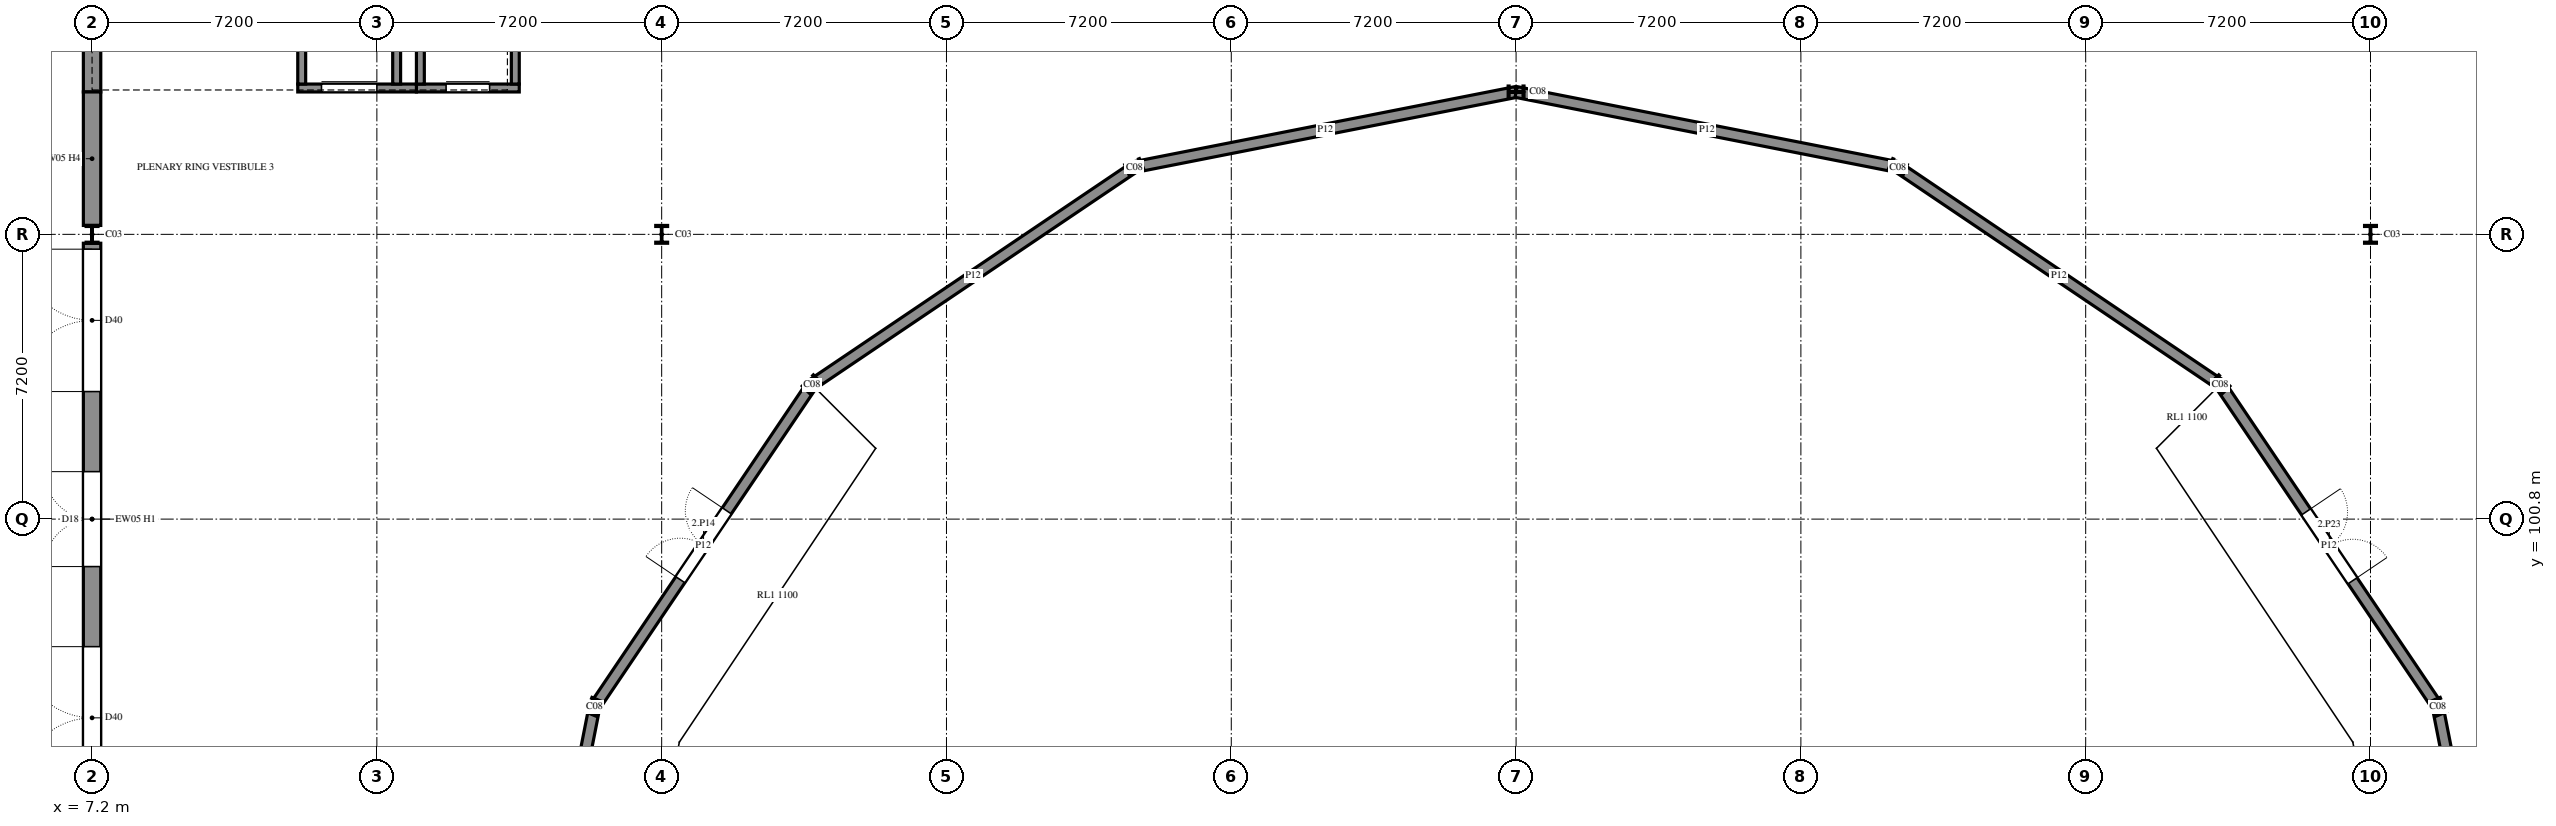
"""IFC4 building model, lengths in metres.
Left out: names, types, materials, properties, quantities, classifications, styles, units other than length and angle.
Written with IfcOpenShell. Run it as: python <this file> out.ifc"""

import sys

from ifc_helpers import new_model, si_unit, direction, frame, frame_2d, origin, origin_2d, place, context, subcontext, project, spatial, rectangle, i_section, extrude, element, fill, save


model = new_model("IFC4")
c1 = context("Model", 3, precision=1e-05, world=origin(), true_north=direction((0.0, 1.0)))
c2 = subcontext(c1, "Body", "Model", "MODEL_VIEW")
j1 = project(units=[si_unit("LENGTHUNIT", "METRE"), si_unit("PLANEANGLEUNIT", "RADIAN")], contexts=[c1])
p1 = place(None, origin())
s1 = spatial("IfcSite", under=j1, at=p1, CompositionType="ELEMENT")
p2 = place(p1, origin())
s2 = spatial("IfcBuilding", under=s1, at=p2, CompositionType="ELEMENT")
p3 = place(p2, frame((0.0, 0.0, 7.2)))
s3 = spatial("IfcBuildingStorey", under=s2, at=p3, CompositionType="ELEMENT", Elevation=7.2)
for number, where, z_axis, x_axis in (
    (1, (7.2, 108.0, 0.0), (0.0, 0.0, 1.0), (1.0, 0.0, 0.0)),
    (2, (21.6, 108.0, 0.0), (0.0, 0.0, 1.0), (1.0, 0.0, 0.0)),
    (3, (64.8, 108.0, 0.0), (0.0, 0.0, 1.0), (1.0, 0.0, 0.0)),
):
    element("IfcColumn", number, at=place(p3, frame(where, z_axis=z_axis, x_axis=x_axis)), inside=s3, PredefinedType="COLUMN", context=c2, shape_type="SweptSolid", body=[
        extrude(i_section(OverallWidth=0.3, OverallDepth=0.45, WebThickness=0.014, FlangeThickness=0.026, FilletRadius=0.027, at=origin_2d()), origin(), (0.0, 0.0, 1.0), 3.6),
    ])
for number, where, z_axis, x_axis in (
    (4, (66.5, 96.05, 0.0), (0.0, 0.0, 1.0), (0.924, 0.383, 0.0)),
    (5, (61.0, 104.2, 0.0), (0.0, 0.0, 1.0), (0.707, 0.707, 0.0)),
    (6, (52.85, 109.7, 0.0), (0.0, 0.0, 1.0), (0.383, 0.924, 0.0)),
    (7, (43.2, 111.6, 0.0), (0.0, 0.0, 1.0), (0.0, 1.0, 0.0)),
    (8, (33.55, 109.7, 0.0), (0.0, 0.0, 1.0), (-0.383, 0.924, 0.0)),
    (9, (25.4, 104.2, 0.0), (0.0, 0.0, 1.0), (-0.707, 0.707, 0.0)),
    (10, (19.9, 96.05, 0.0), (0.0, 0.0, 1.0), (-0.924, 0.383, 0.0)),
):
    element("IfcColumn", number, at=place(p3, frame(where, z_axis=z_axis, x_axis=x_axis)), inside=s3, PredefinedType="COLUMN", context=c2, shape_type="SweptSolid", body=[
        extrude(i_section(OverallWidth=0.3, OverallDepth=0.4, WebThickness=0.013, FlangeThickness=0.024, FilletRadius=0.027, at=origin_2d()), origin(), (0.0, 0.0, 1.0), 3.6),
    ])
p4 = place(p3, frame((7.2, 115.775, 0.0), z_axis=(0.0, 0.0, 1.0), x_axis=(0.0, -1.0, 0.0)))
e11 = element("IfcWall", 11, at=p4, inside=s3, PredefinedType="SOLIDWALL", context=c2, shape_type="SweptSolid", body=[
    extrude(rectangle(XDim=4.175, YDim=0.44, at=frame_2d((2.087, 0.0))), origin(), (0.0, 0.0, 1.0), 3.42),
])
p5 = place(p4, frame((1.175, 0.0, 0.015)))
e12 = element("IfcOpeningElement", 12, at=p5, cuts=e11, PredefinedType="OPENING", context=c2, shape_type="SweptSolid", body=[
    extrude(rectangle(XDim=1.8, YDim=2.1, at=frame_2d((0.9, 1.05))), frame((0.0, 0.23, 0.0), z_axis=(0.0, -1.0, 0.0), x_axis=(1.0, 0.0, 0.0)), (0.0, 0.0, 1.0), 0.46),
])
p6 = place(p3, frame((7.2, 111.6, 0.0), z_axis=(0.0, 0.0, 1.0), x_axis=(0.0, -1.0, 0.0)))
e13 = element("IfcWall", 13, at=p6, inside=s3, PredefinedType="SOLIDWALL", context=c2, shape_type="SweptSolid", body=[
    extrude(rectangle(XDim=3.375, YDim=0.44, at=frame_2d((1.688, 0.0))), origin(), (0.0, 0.0, 1.0), 3.42),
])
p7 = place(p3, frame((7.2, 107.775, 0.0), z_axis=(0.0, 0.0, 1.0), x_axis=(0.0, -1.0, 0.0)))
e14 = element("IfcWall", 14, at=p7, inside=s3, PredefinedType="SOLIDWALL", context=c2, shape_type="SweptSolid", body=[
    extrude(rectangle(XDim=13.95, YDim=0.44, at=frame_2d((6.975, 0.0))), origin(), (0.0, 0.0, 1.0), 2.82),
])
p8 = place(p7, frame((0.15, 0.0, 0.0)))
e15 = element("IfcOpeningElement", 15, at=p8, cuts=e14, PredefinedType="OPENING", context=c2, shape_type="SweptSolid", body=[
    extrude(rectangle(XDim=3.6, YDim=2.7, at=frame_2d((1.8, 1.35))), frame((0.0, 0.23, 0.0), z_axis=(0.0, -1.0, 0.0), x_axis=(1.0, 0.0, 0.0)), (0.0, 0.0, 1.0), 0.46),
])
p9 = place(p7, frame((5.775, 0.0, 0.0)))
e16 = element("IfcOpeningElement", 16, at=p9, cuts=e14, PredefinedType="OPENING", context=c2, shape_type="SweptSolid", body=[
    extrude(rectangle(XDim=2.4, YDim=2.4, at=frame_2d((1.2, 1.2))), frame((0.0, 0.23, 0.0), z_axis=(0.0, -1.0, 0.0), x_axis=(1.0, 0.0, 0.0)), (0.0, 0.0, 1.0), 0.46),
])
p10 = place(p7, frame((10.2, 0.0, 0.0)))
e17 = element("IfcOpeningElement", 17, at=p10, cuts=e14, PredefinedType="OPENING", context=c2, shape_type="SweptSolid", body=[
    extrude(rectangle(XDim=3.6, YDim=2.7, at=frame_2d((1.8, 1.35))), frame((0.0, 0.23, 0.0), z_axis=(0.0, -1.0, 0.0), x_axis=(1.0, 0.0, 0.0)), (0.0, 0.0, 1.0), 0.46),
])
p11 = place(p3, frame((15.4, 111.7, 0.0), z_axis=(0.0, 0.0, 1.0), x_axis=(1.0, 0.0, 0.0)))
e18 = element("IfcWall", 18, at=p11, inside=s3, PredefinedType="SHEAR", context=c2, shape_type="SweptSolid", body=[
    extrude(rectangle(XDim=2.6, YDim=0.2, at=frame_2d((1.3, 0.0))), origin(), (0.0, 0.0, 1.0), 3.6),
])
p12 = place(p11, frame((0.75, 0.0, 0.0)))
e19 = element("IfcOpeningElement", 19, at=p12, cuts=e18, PredefinedType="OPENING", context=c2, shape_type="SweptSolid", body=[
    extrude(rectangle(XDim=1.1, YDim=2.1, at=frame_2d((0.55, 1.05))), frame((0.0, 0.11, 0.0), z_axis=(0.0, -1.0, 0.0), x_axis=(1.0, 0.0, 0.0)), (0.0, 0.0, 1.0), 0.22),
])
for number, where, z_axis, x_axis in (
    (20, (15.5, 111.8, 0.0), (0.0, 0.0, 1.0), (0.0, 1.0, 0.0)),
    (21, (17.9, 111.8, 0.0), (0.0, 0.0, 1.0), (0.0, 1.0, 0.0)),
):
    element("IfcWall", number, at=place(p3, frame(where, z_axis=z_axis, x_axis=x_axis)), inside=s3, PredefinedType="SHEAR", context=c2, shape_type="SweptSolid", body=[
        extrude(rectangle(XDim=2.2, YDim=0.2, at=frame_2d((1.1, 0.0))), origin(), (0.0, 0.0, 1.0), 3.6),
    ])
p13 = place(p3, frame((12.4, 111.7, 0.0), z_axis=(0.0, 0.0, 1.0), x_axis=(1.0, 0.0, 0.0)))
e22 = element("IfcWall", 22, at=p13, inside=s3, PredefinedType="SHEAR", context=c2, shape_type="SweptSolid", body=[
    extrude(rectangle(XDim=3.0, YDim=0.2, at=frame_2d((1.5, 0.0))), origin(), (0.0, 0.0, 1.0), 3.6),
])
p14 = place(p13, frame((0.6, 0.0, 0.0)))
e23 = element("IfcOpeningElement", 23, at=p14, cuts=e22, PredefinedType="OPENING", context=c2, shape_type="SweptSolid", body=[
    extrude(rectangle(XDim=1.4, YDim=2.1, at=frame_2d((0.7, 1.05))), frame((0.0, 0.11, 0.0), z_axis=(0.0, -1.0, 0.0), x_axis=(1.0, 0.0, 0.0)), (0.0, 0.0, 1.0), 0.22),
])
for number, where, z_axis, x_axis in (
    (24, (12.5, 111.8, 0.0), (0.0, 0.0, 1.0), (0.0, 1.0, 0.0)),
    (25, (14.9, 111.8, 0.0), (0.0, 0.0, 1.0), (0.0, 1.0, 0.0)),
):
    element("IfcWall", number, at=place(p3, frame(where, z_axis=z_axis, x_axis=x_axis)), inside=s3, PredefinedType="SHEAR", context=c2, shape_type="SweptSolid", body=[
        extrude(rectangle(XDim=2.5, YDim=0.2, at=frame_2d((1.25, 0.0))), origin(), (0.0, 0.0, 1.0), 3.6),
    ])
p15 = place(p3, frame((43.2, 111.6, 0.0), z_axis=(0.0, 0.0, 1.0), x_axis=(-0.981159681755, -0.19319854787, 0.0)))
e26 = element("IfcWall", 26, at=p15, inside=s3, PredefinedType="PARTITIONING", context=c2, shape_type="SweptSolid", body=[
    extrude(rectangle(XDim=9.835, YDim=0.275, at=frame_2d((4.917, 0.0))), origin(), (0.0, 0.0, 1.0), 3.07),
])
p16 = place(p3, frame((33.55, 109.7, 0.0), z_axis=(0.0, 0.0, 1.0), x_axis=(-0.828912285216, -0.559378604719, 0.0)))
e27 = element("IfcWall", 27, at=p16, inside=s3, PredefinedType="PARTITIONING", context=c2, shape_type="SweptSolid", body=[
    extrude(rectangle(XDim=9.832, YDim=0.275, at=frame_2d((4.916, 0.0))), origin(), (0.0, 0.0, 1.0), 3.07),
])
p17 = place(p3, frame((25.4, 104.2, 0.0), z_axis=(0.0, 0.0, 1.0), x_axis=(-0.559390118145, -0.828904515443, 0.0)))
e28 = element("IfcWall", 28, at=p17, inside=s3, PredefinedType="PARTITIONING", context=c2, shape_type="SweptSolid", body=[
    extrude(rectangle(XDim=9.832, YDim=0.275, at=frame_2d((4.916, 0.0))), origin(), (0.0, 0.0, 1.0), 3.07),
])
p18 = place(p17, frame((3.85, 0.0, 0.0)))
e29 = element("IfcOpeningElement", 29, at=p18, cuts=e28, PredefinedType="OPENING", context=c2, shape_type="SweptSolid", body=[
    extrude(rectangle(XDim=2.1, YDim=2.4, at=frame_2d((1.05, 1.2))), frame((0.0, 0.147, 0.0), z_axis=(0.0, -1.0, 0.0), x_axis=(1.0, 0.0, 0.0)), (0.0, 0.0, 1.0), 0.295),
])
p19 = place(p3, frame((19.9, 96.05, 0.0), z_axis=(0.0, 0.0, 1.0), x_axis=(-0.1931699463, -0.98116531321, 0.0)))
e30 = element("IfcWall", 30, at=p19, inside=s3, PredefinedType="PARTITIONING", context=c2, shape_type="SweptSolid", body=[
    extrude(rectangle(XDim=9.835, YDim=0.275, at=frame_2d((4.918, 0.0))), origin(), (0.0, 0.0, 1.0), 3.07),
])
p20 = place(p19, frame((3.85, 0.0, 0.0)))
e31 = element("IfcOpeningElement", 31, at=p20, cuts=e30, PredefinedType="OPENING", context=c2, shape_type="SweptSolid", body=[
    extrude(rectangle(XDim=2.1, YDim=2.4, at=frame_2d((1.05, 1.2))), frame((0.0, 0.147, 0.0), z_axis=(0.0, -1.0, 0.0), x_axis=(1.0, 0.0, 0.0)), (0.0, 0.0, 1.0), 0.295),
])
p21 = place(p3, frame((68.4, 86.4, 0.0), z_axis=(0.0, 0.0, 1.0), x_axis=(-0.1931699463, 0.98116531321, 0.0)))
e32 = element("IfcWall", 32, at=p21, inside=s3, PredefinedType="PARTITIONING", context=c2, shape_type="SweptSolid", body=[
    extrude(rectangle(XDim=9.835, YDim=0.275, at=frame_2d((4.918, 0.0))), origin(), (0.0, 0.0, 1.0), 3.07),
])
p22 = place(p21, frame((3.85, 0.0, 0.0)))
e33 = element("IfcOpeningElement", 33, at=p22, cuts=e32, PredefinedType="OPENING", context=c2, shape_type="SweptSolid", body=[
    extrude(rectangle(XDim=2.1, YDim=2.4, at=frame_2d((1.05, 1.2))), frame((0.0, 0.147, 0.0), z_axis=(0.0, -1.0, 0.0), x_axis=(1.0, 0.0, 0.0)), (0.0, 0.0, 1.0), 0.295),
])
p23 = place(p3, frame((66.5, 96.05, 0.0), z_axis=(0.0, 0.0, 1.0), x_axis=(-0.559390118145, 0.828904515443, 0.0)))
e34 = element("IfcWall", 34, at=p23, inside=s3, PredefinedType="PARTITIONING", context=c2, shape_type="SweptSolid", body=[
    extrude(rectangle(XDim=9.832, YDim=0.275, at=frame_2d((4.916, 0.0))), origin(), (0.0, 0.0, 1.0), 3.07),
])
p24 = place(p23, frame((3.85, 0.0, 0.0)))
e35 = element("IfcOpeningElement", 35, at=p24, cuts=e34, PredefinedType="OPENING", context=c2, shape_type="SweptSolid", body=[
    extrude(rectangle(XDim=2.1, YDim=2.4, at=frame_2d((1.05, 1.2))), frame((0.0, 0.147, 0.0), z_axis=(0.0, -1.0, 0.0), x_axis=(1.0, 0.0, 0.0)), (0.0, 0.0, 1.0), 0.295),
])
p25 = place(p3, frame((61.0, 104.2, 0.0), z_axis=(0.0, 0.0, 1.0), x_axis=(-0.828904515443, 0.559390118145, 0.0)))
e36 = element("IfcWall", 36, at=p25, inside=s3, PredefinedType="PARTITIONING", context=c2, shape_type="SweptSolid", body=[
    extrude(rectangle(XDim=9.832, YDim=0.275, at=frame_2d((4.916, 0.0))), origin(), (0.0, 0.0, 1.0), 3.07),
])
p26 = place(p3, frame((52.85, 109.7, 0.0), z_axis=(0.0, 0.0, 1.0), x_axis=(-0.981160608262, 0.193193842541, 0.0)))
e37 = element("IfcWall", 37, at=p26, inside=s3, PredefinedType="PARTITIONING", context=c2, shape_type="SweptSolid", body=[
    extrude(rectangle(XDim=9.835, YDim=0.275, at=frame_2d((4.918, 0.0))), origin(), (0.0, 0.0, 1.0), 3.07),
])
p27 = place(p8, frame((3.6, 0.0, 0.0), z_axis=(0.0, 0.0, 1.0), x_axis=(-1.0, 0.0, 0.0)))
e38 = element("IfcDoor", 38, at=p27, inside=s3, OperationType="DOUBLE_DOOR_SINGLE_SWING", PredefinedType="DOOR", context=c2, shape_type="SweptSolid", body=[
    extrude(rectangle(XDim=3.6, YDim=2.7, at=frame_2d((1.8, 1.35))), frame((0.0, 0.025, 0.0), z_axis=(0.0, -1.0, 0.0), x_axis=(1.0, 0.0, 0.0)), (0.0, 0.0, 1.0), 0.05),
])
fill(e15, e38)
p28 = place(p9, frame((2.4, 0.0, 0.0), z_axis=(0.0, 0.0, 1.0), x_axis=(-1.0, 0.0, 0.0)))
e39 = element("IfcDoor", 39, at=p28, inside=s3, OperationType="DOUBLE_DOOR_SINGLE_SWING", PredefinedType="DOOR", context=c2, shape_type="SweptSolid", body=[
    extrude(rectangle(XDim=2.4, YDim=2.4, at=frame_2d((1.2, 1.2))), frame((0.0, 0.025, 0.0), z_axis=(0.0, -1.0, 0.0), x_axis=(1.0, 0.0, 0.0)), (0.0, 0.0, 1.0), 0.05),
])
fill(e16, e39)
p29 = place(p10, frame((3.6, 0.0, 0.0), z_axis=(0.0, 0.0, 1.0), x_axis=(-1.0, 0.0, 0.0)))
e40 = element("IfcDoor", 40, at=p29, inside=s3, OperationType="DOUBLE_DOOR_SINGLE_SWING", PredefinedType="DOOR", context=c2, shape_type="SweptSolid", body=[
    extrude(rectangle(XDim=3.6, YDim=2.7, at=frame_2d((1.8, 1.35))), frame((0.0, 0.025, 0.0), z_axis=(0.0, -1.0, 0.0), x_axis=(1.0, 0.0, 0.0)), (0.0, 0.0, 1.0), 0.05),
])
fill(e17, e40)
p30 = place(p12, origin())
e41 = element("IfcDoor", 41, at=p30, inside=s3, OperationType="SLIDING_TO_LEFT", PredefinedType="DOOR", context=c2, shape_type="SweptSolid", body=[
    extrude(rectangle(XDim=1.1, YDim=2.1, at=frame_2d((0.55, 1.05))), frame((0.0, 0.025, 0.0), z_axis=(0.0, -1.0, 0.0), x_axis=(1.0, 0.0, 0.0)), (0.0, 0.0, 1.0), 0.05),
])
fill(e19, e41)
p31 = place(p14, origin())
e42 = element("IfcDoor", 42, at=p31, inside=s3, OperationType="SLIDING_TO_LEFT", PredefinedType="DOOR", context=c2, shape_type="SweptSolid", body=[
    extrude(rectangle(XDim=1.4, YDim=2.1, at=frame_2d((0.7, 1.05))), frame((0.0, 0.025, 0.0), z_axis=(0.0, -1.0, 0.0), x_axis=(1.0, 0.0, 0.0)), (0.0, 0.0, 1.0), 0.05),
])
fill(e23, e42)
p32 = place(p18, frame((2.1, 0.0, 0.0), z_axis=(0.0, 0.0, 1.0), x_axis=(-1.0, 0.0, 0.0)))
e43 = element("IfcDoor", 43, at=p32, inside=s3, OperationType="DOUBLE_DOOR_SINGLE_SWING", PredefinedType="DOOR", context=c2, shape_type="SweptSolid", body=[
    extrude(rectangle(XDim=2.1, YDim=2.4, at=frame_2d((1.05, 1.2))), frame((0.0, 0.025, 0.0), z_axis=(0.0, -1.0, 0.0), x_axis=(1.0, 0.0, 0.0)), (0.0, 0.0, 1.0), 0.05),
])
fill(e29, e43)
p33 = place(p24, frame((2.1, 0.0, 0.0), z_axis=(0.0, 0.0, 1.0), x_axis=(-1.0, 0.0, 0.0)))
e44 = element("IfcDoor", 44, at=p33, inside=s3, OperationType="DOUBLE_DOOR_SINGLE_SWING", PredefinedType="DOOR", context=c2, shape_type="SweptSolid", body=[
    extrude(rectangle(XDim=2.1, YDim=2.4, at=frame_2d((1.05, 1.2))), frame((0.0, 0.025, 0.0), z_axis=(0.0, -1.0, 0.0), x_axis=(1.0, 0.0, 0.0)), (0.0, 0.0, 1.0), 0.05),
])
fill(e35, e44)
save(model, sys.argv[1])
